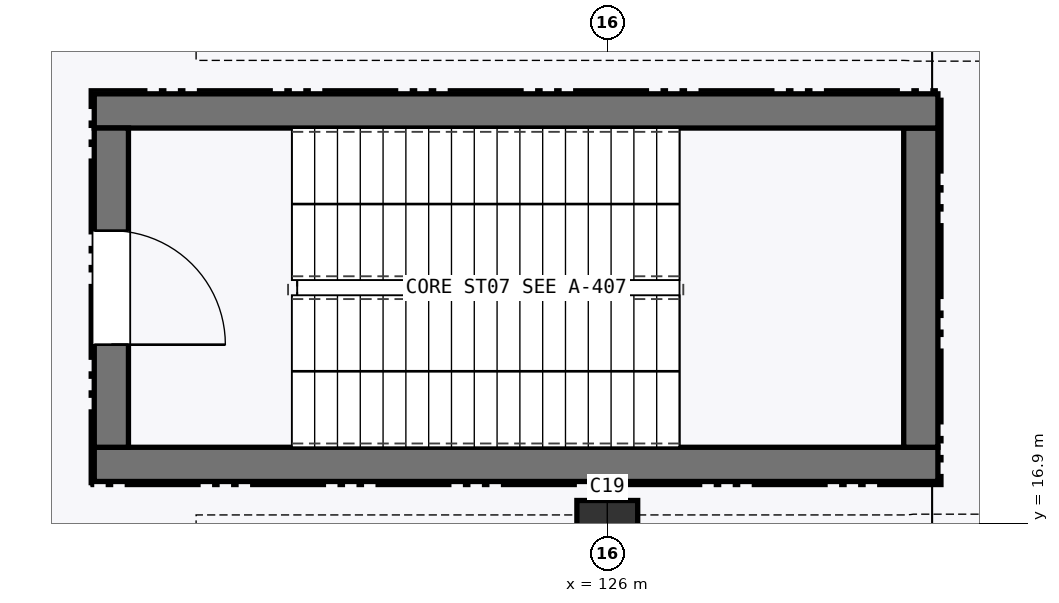
"""IFC4 building model, lengths in metres.
Left out: names, types, materials, properties, quantities, classifications, styles, units other than length and angle.
Written with IfcOpenShell. Run it as: python <this file> out.ifc"""

import sys

from ifc_helpers import new_model, si_unit, direction, frame, frame_2d, origin, origin_2d, place, context, subcontext, project, spatial, rectangle, extrude, element, fill, save


model = new_model("IFC4")
c1 = context("Model", 3, precision=1e-05, world=origin(), true_north=direction((0.0, 1.0)))
c2 = subcontext(c1, "Body", "Model", "MODEL_VIEW")
j1 = project(units=[si_unit("LENGTHUNIT", "METRE"), si_unit("PLANEANGLEUNIT", "RADIAN")], contexts=[c1])
p1 = place(None, origin())
s1 = spatial("IfcSite", under=j1, at=p1, CompositionType="ELEMENT")
p2 = place(p1, origin())
s2 = spatial("IfcBuilding", under=s1, at=p2, CompositionType="ELEMENT")
p3 = place(p2, frame((0.0, 0.0, 6.0)))
s3 = spatial("IfcBuildingStorey", under=s2, at=p3, CompositionType="ELEMENT", Elevation=6.0)
p4 = place(p3, frame((126.0, 16.8, 0.0), z_axis=(0.0, 0.0, 1.0), x_axis=(1.0, 0.0, 0.0)))
e1 = element("IfcColumn", 1, at=p4, inside=s3, PredefinedType="COLUMN", context=c2, shape_type="SweptSolid", body=[
    extrude(rectangle(XDim=0.8, YDim=0.8, at=origin_2d()), origin(), (0.0, 0.0, 1.0), 5.4),
])
p5 = place(p3, frame((119.25, 17.675, 0.0), z_axis=(0.0, 0.0, 1.0), x_axis=(1.0, 0.0, 0.0)))
e2 = element("IfcWall", 2, at=p5, inside=s3, PredefinedType="SHEAR", context=c2, shape_type="SweptSolid", body=[
    extrude(rectangle(XDim=11.1, YDim=0.45, at=frame_2d((5.55, 0.0))), origin(), (0.0, 0.0, 1.0), 5.145),
])
p6 = place(p3, frame((130.125, 17.9, 0.0), z_axis=(0.0, 0.0, 1.0), x_axis=(0.0, 1.0, 0.0)))
e3 = element("IfcWall", 3, at=p6, inside=s3, PredefinedType="SHEAR", context=c2, shape_type="SweptSolid", body=[
    extrude(rectangle(XDim=4.2, YDim=0.45, at=frame_2d((2.1, 0.0))), origin(), (0.0, 0.0, 1.0), 5.145),
])
p7 = place(p3, frame((130.35, 22.325, 0.0), z_axis=(0.0, 0.0, 1.0), x_axis=(-1.0, 0.0, 0.0)))
e4 = element("IfcWall", 4, at=p7, inside=s3, PredefinedType="SHEAR", context=c2, shape_type="SweptSolid", body=[
    extrude(rectangle(XDim=11.1, YDim=0.45, at=frame_2d((5.55, 0.0))), origin(), (0.0, 0.0, 1.0), 5.145),
])
p8 = place(p3, frame((119.475, 22.1, 0.0), z_axis=(0.0, 0.0, 1.0), x_axis=(0.0, -1.0, 0.0)))
e5 = element("IfcWall", 5, at=p8, inside=s3, PredefinedType="SHEAR", context=c2, shape_type="SweptSolid", body=[
    extrude(rectangle(XDim=4.2, YDim=0.45, at=frame_2d((2.1, 0.0))), origin(), (0.0, 0.0, 1.0), 5.145),
])
p9 = place(p8, frame((1.35, 0.0, 0.0)))
e6 = element("IfcOpeningElement", 6, at=p9, cuts=e5, PredefinedType="OPENING", context=c2, shape_type="SweptSolid", body=[
    extrude(rectangle(XDim=1.5, YDim=2.15, at=frame_2d((0.75, 1.075))), frame((0.0, 0.235, 0.0), z_axis=(0.0, -1.0, 0.0), x_axis=(1.0, 0.0, 0.0)), (0.0, 0.0, 1.0), 0.47),
])
p10 = place(p9, origin())
e7 = element("IfcDoor", 7, at=p10, inside=s3, OperationType="SINGLE_SWING_RIGHT", PredefinedType="DOOR", context=c2, shape_type="SweptSolid", body=[
    extrude(rectangle(XDim=1.5, YDim=2.15, at=frame_2d((0.75, 1.075))), frame((0.0, 0.025, 0.0), z_axis=(0.0, -1.0, 0.0), x_axis=(1.0, 0.0, 0.0)), (0.0, 0.0, 1.0), 0.05),
])
fill(e6, e7)
save(model, sys.argv[1])
